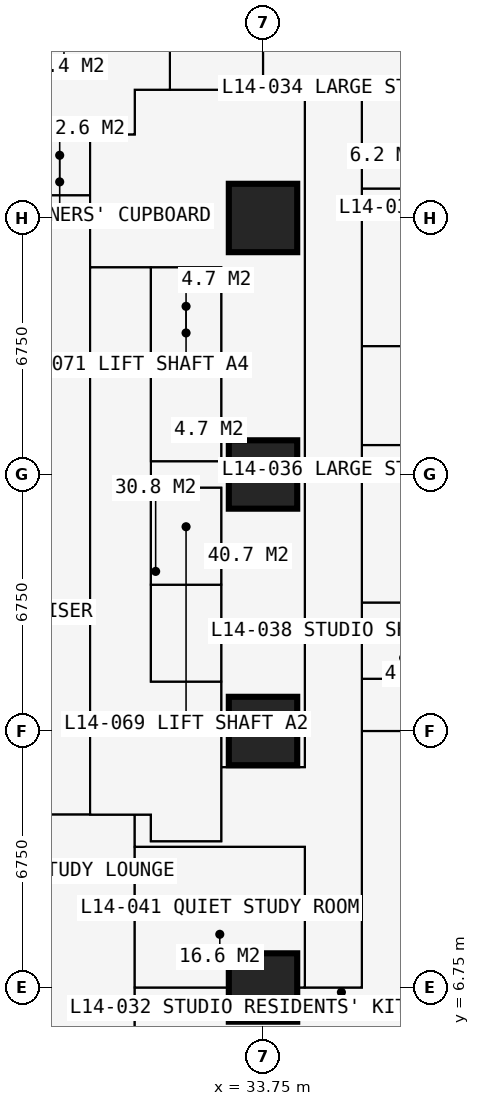
"""IFC4 building model, lengths in metres.
Left out: names, types, materials, properties, quantities, classifications, styles, units other than length and angle.
Written with IfcOpenShell. Run it as: python <this file> out.ifc"""

import sys

from ifc_helpers import new_model, si_unit, direction, frame, frame_2d, origin, origin_2d, place, context, subcontext, project, spatial, rectangle, extrude, element, fill, save


model = new_model("IFC4")
c1 = context("Model", 3, precision=1e-05, world=origin(), true_north=direction((0.0, 1.0)))
c2 = subcontext(c1, "Body", "Model", "MODEL_VIEW")
j1 = project(units=[si_unit("LENGTHUNIT", "METRE"), si_unit("PLANEANGLEUNIT", "RADIAN")], contexts=[c1])
p1 = place(None, origin())
s1 = spatial("IfcSite", under=j1, at=p1, CompositionType="ELEMENT")
p2 = place(p1, origin())
s2 = spatial("IfcBuilding", under=s1, at=p2, CompositionType="ELEMENT")
p3 = place(p2, frame((0.0, 0.0, 54.0)))
s3 = spatial("IfcBuildingStorey", under=s2, at=p3, CompositionType="ELEMENT", Elevation=54.0)
for number, where, z_axis, x_axis in (
    (1, (33.75, 6.75, 0.0), (0.0, 0.0, 1.0), (1.0, 0.0, 0.0)),
    (2, (33.75, 13.5, 0.0), (0.0, 0.0, 1.0), (1.0, 0.0, 0.0)),
    (3, (33.75, 20.25, 0.0), (0.0, 0.0, 1.0), (1.0, 0.0, 0.0)),
    (4, (33.75, 27.0, 0.0), (0.0, 0.0, 1.0), (1.0, 0.0, 0.0)),
):
    element("IfcColumn", number, at=place(p3, frame(where, z_axis=z_axis, x_axis=x_axis)), inside=s3, PredefinedType="COLUMN", context=c2, shape_type="SweptSolid", body=[
        extrude(rectangle(XDim=1.8, YDim=1.8, at=origin_2d()), origin(), (0.0, 0.0, 1.0), 3.6),
    ])
p4 = place(p3, frame((10.125, 11.3, 0.0), z_axis=(0.0, 0.0, 1.0), x_axis=(1.0, 0.0, 0.0)))
e5 = element("IfcWall", 5, at=p4, inside=s3, PredefinedType="PARTITIONING", context=c2, shape_type="SweptSolid", body=[
    extrude(rectangle(XDim=20.675, YDim=0.15, at=frame_2d((10.337, 0.0))), origin(), (0.0, 0.0, 1.0), 3.375),
])
p5 = place(p4, frame((1.775, 0.0, 0.0)))
e6 = element("IfcOpeningElement", 6, at=p5, cuts=e5, PredefinedType="OPENING", context=c2, shape_type="SweptSolid", body=[
    extrude(rectangle(XDim=1.0, YDim=2.2, at=frame_2d((0.5, 1.1))), frame((0.0, 0.085, 0.0), z_axis=(0.0, -1.0, 0.0), x_axis=(1.0, 0.0, 0.0)), (0.0, 0.0, 1.0), 0.17),
])
p6 = place(p4, frame((11.312, 0.0, 0.0)))
e7 = element("IfcOpeningElement", 7, at=p6, cuts=e5, PredefinedType="OPENING", context=c2, shape_type="SweptSolid", body=[
    extrude(rectangle(XDim=1.0, YDim=2.2, at=frame_2d((0.5, 1.1))), frame((0.0, 0.085, 0.0), z_axis=(0.0, -1.0, 0.0), x_axis=(1.0, 0.0, 0.0)), (0.0, 0.0, 1.0), 0.17),
])
p7 = place(p3, frame((11.3, 29.2, 0.0), z_axis=(0.0, 0.0, 1.0), x_axis=(1.0, 0.0, 0.0)))
e8 = element("IfcWall", 8, at=p7, inside=s3, PredefinedType="PARTITIONING", context=c2, shape_type="SweptSolid", body=[
    extrude(rectangle(XDim=19.075, YDim=0.15, at=frame_2d((9.538, 0.0))), origin(), (0.0, 0.0, 1.0), 3.375),
])
p8 = place(p7, frame((12.875, 0.0, 0.0)))
e9 = element("IfcOpeningElement", 9, at=p8, cuts=e8, PredefinedType="OPENING", context=c2, shape_type="SweptSolid", body=[
    extrude(rectangle(XDim=1.0, YDim=2.2, at=frame_2d((0.5, 1.1))), frame((0.0, 0.085, 0.0), z_axis=(0.0, -1.0, 0.0), x_axis=(1.0, 0.0, 0.0)), (0.0, 0.0, 1.0), 0.17),
])
p9 = place(p7, frame((10.438, 0.0, 0.0)))
e10 = element("IfcOpeningElement", 10, at=p9, cuts=e8, PredefinedType="OPENING", context=c2, shape_type="SweptSolid", body=[
    extrude(rectangle(XDim=1.0, YDim=2.2, at=frame_2d((0.5, 1.1))), frame((0.0, 0.085, 0.0), z_axis=(0.0, -1.0, 0.0), x_axis=(1.0, 0.0, 0.0)), (0.0, 0.0, 1.0), 0.17),
])
p10 = place(p7, frame((14.875, 0.0, 0.0)))
e11 = element("IfcOpeningElement", 11, at=p10, cuts=e8, PredefinedType="OPENING", context=c2, shape_type="SweptSolid", body=[
    extrude(rectangle(XDim=0.95, YDim=2.2, at=frame_2d((0.475, 1.1))), frame((0.0, 0.085, 0.0), z_axis=(0.0, -1.0, 0.0), x_axis=(1.0, 0.0, 0.0)), (0.0, 0.0, 1.0), 0.17),
])
p11 = place(p3, frame((27.6, 27.6, 0.0), z_axis=(0.0, 0.0, 1.0), x_axis=(1.0, 0.0, 0.0)))
e12 = element("IfcWall", 12, at=p11, inside=s3, PredefinedType="PARTITIONING", context=c2, shape_type="SweptSolid", body=[
    extrude(rectangle(XDim=1.6, YDim=0.15, at=frame_2d((0.8, 0.0))), origin(), (0.0, 0.0, 1.0), 2.877),
])
p12 = place(p3, frame((29.2, 11.3, 0.0), z_axis=(0.0, 0.0, 1.0), x_axis=(0.0, 1.0, 0.0)))
e13 = element("IfcWall", 13, at=p12, inside=s3, PredefinedType="PARTITIONING", context=c2, shape_type="SweptSolid", body=[
    extrude(rectangle(XDim=17.9, YDim=0.2, at=frame_2d((8.95, 0.0))), origin(), (0.0, 0.0, 1.0), 3.375),
])
p13 = place(p12, frame((8.35, 0.0, 0.0)))
e14 = element("IfcOpeningElement", 14, at=p13, cuts=e13, PredefinedType="OPENING", context=c2, shape_type="SweptSolid", body=[
    extrude(rectangle(XDim=1.2, YDim=2.2, at=frame_2d((0.6, 1.1))), frame((0.0, 0.11, 0.0), z_axis=(0.0, -1.0, 0.0), x_axis=(1.0, 0.0, 0.0)), (0.0, 0.0, 1.0), 0.22),
])
p14 = place(p3, frame((29.2, 25.7, 0.0), z_axis=(0.0, 0.0, 1.0), x_axis=(1.0, 0.0, 0.0)))
e15 = element("IfcWall", 15, at=p14, inside=s3, PredefinedType="SHEAR", context=c2, shape_type="SweptSolid", body=[
    extrude(rectangle(XDim=3.45, YDim=0.1, at=frame_2d((1.725, 0.0))), origin(), (0.0, 0.0, 1.0), 3.375),
])
p15 = place(p3, frame((30.375, -0.734, 0.0), z_axis=(0.0, 0.0, 1.0), x_axis=(0.0, 1.0, 0.0)))
e16 = element("IfcWall", 16, at=p15, inside=s3, PredefinedType="PARTITIONING", context=c2, shape_type="SweptSolid", body=[
    extrude(rectangle(XDim=12.034, YDim=0.15, at=frame_2d((6.017, 0.0))), origin(), (0.0, 0.0, 1.0), 3.375),
])
p16 = place(p15, frame((5.134, 0.0, 0.0)))
e17 = element("IfcOpeningElement", 17, at=p16, cuts=e16, PredefinedType="OPENING", context=c2, shape_type="SweptSolid", body=[
    extrude(rectangle(XDim=1.0, YDim=2.2, at=frame_2d((0.5, 1.1))), frame((0.0, 0.085, 0.0), z_axis=(0.0, -1.0, 0.0), x_axis=(1.0, 0.0, 0.0)), (0.0, 0.0, 1.0), 0.17),
])
p17 = place(p3, frame((30.375, 6.75, 0.0), z_axis=(0.0, 0.0, 1.0), x_axis=(1.0, 0.0, 0.0)))
e18 = element("IfcWall", 18, at=p17, inside=s3, PredefinedType="PARTITIONING", context=c2, shape_type="SweptSolid", body=[
    extrude(rectangle(XDim=5.975, YDim=0.15, at=frame_2d((2.988, 0.0))), origin(), (0.0, 0.0, 1.0), 2.877),
])
p18 = place(p3, frame((30.375, 10.45, 0.0), z_axis=(0.0, 0.0, 1.0), x_axis=(1.0, 0.0, 0.0)))
e19 = element("IfcWall", 19, at=p18, inside=s3, PredefinedType="PARTITIONING", context=c2, shape_type="SweptSolid", body=[
    extrude(rectangle(XDim=4.475, YDim=0.15, at=frame_2d((2.238, 0.0))), origin(), (0.0, 0.0, 1.0), 3.375),
])
p19 = place(p18, frame((2.35, 0.0, 0.0)))
e20 = element("IfcOpeningElement", 20, at=p19, cuts=e19, PredefinedType="OPENING", context=c2, shape_type="SweptSolid", body=[
    extrude(rectangle(XDim=0.95, YDim=2.2, at=frame_2d((0.475, 1.1))), frame((0.0, 0.085, 0.0), z_axis=(0.0, -1.0, 0.0), x_axis=(1.0, 0.0, 0.0)), (0.0, 0.0, 1.0), 0.17),
])
p20 = place(p3, frame((30.375, 29.2, 0.0), z_axis=(0.0, 0.0, 1.0), x_axis=(0.0, 1.0, 0.0)))
e21 = element("IfcWall", 21, at=p20, inside=s3, PredefinedType="PARTITIONING", context=c2, shape_type="SweptSolid", body=[
    extrude(rectangle(XDim=1.175, YDim=0.15, at=frame_2d((0.587, 0.0))), origin(), (0.0, 0.0, 1.0), 3.375),
])
p21 = place(p3, frame((30.375, 30.375, 0.0), z_axis=(0.0, 0.0, 1.0), x_axis=(1.0, 0.0, 0.0)))
e22 = element("IfcWall", 22, at=p21, inside=s3, PredefinedType="PARTITIONING", context=c2, shape_type="SweptSolid", body=[
    extrude(rectangle(XDim=10.859, YDim=0.15, at=frame_2d((5.429, 0.0))), origin(), (0.0, 0.0, 1.0), 3.375),
])
p22 = place(p3, frame((30.8, 10.6, 0.0), z_axis=(0.0, 0.0, 1.0), x_axis=(0.0, 1.0, 0.0)))
e23 = element("IfcWall", 23, at=p22, inside=s3, PredefinedType="PARTITIONING", context=c2, shape_type="SweptSolid", body=[
    extrude(rectangle(XDim=0.7, YDim=0.15, at=frame_2d((0.35, 0.0))), origin(), (0.0, 0.0, 1.0), 3.375),
])
p23 = place(p3, frame((30.8, 10.6, 0.0), z_axis=(0.0, 0.0, 1.0), x_axis=(1.0, 0.0, 0.0)))
e24 = element("IfcWall", 24, at=p23, inside=s3, PredefinedType="PARTITIONING", context=c2, shape_type="SweptSolid", body=[
    extrude(rectangle(XDim=1.85, YDim=0.15, at=frame_2d((0.925, 0.0))), origin(), (0.0, 0.0, 1.0), 3.375),
])
p24 = place(p3, frame((30.8, 14.8, 0.0), z_axis=(0.0, 0.0, 1.0), x_axis=(0.0, 1.0, 0.0)))
e25 = element("IfcWall", 25, at=p24, inside=s3, PredefinedType="PARTITIONING", context=c2, shape_type="SweptSolid", body=[
    extrude(rectangle(XDim=10.9, YDim=0.15, at=frame_2d((5.45, 0.0))), origin(), (0.0, 0.0, 1.0), 3.375),
])
p25 = place(p24, frame((0.75, 0.0, 0.0)))
e26 = element("IfcOpeningElement", 26, at=p25, cuts=e25, PredefinedType="OPENING", context=c2, shape_type="SweptSolid", body=[
    extrude(rectangle(XDim=1.1, YDim=2.2, at=frame_2d((0.55, 1.1))), frame((0.0, 0.085, 0.0), z_axis=(0.0, -1.0, 0.0), x_axis=(1.0, 0.0, 0.0)), (0.0, 0.0, 1.0), 0.17),
])
p26 = place(p24, frame((3.25, 0.0, 0.0)))
e27 = element("IfcOpeningElement", 27, at=p26, cuts=e25, PredefinedType="OPENING", context=c2, shape_type="SweptSolid", body=[
    extrude(rectangle(XDim=1.1, YDim=2.2, at=frame_2d((0.55, 1.1))), frame((0.0, 0.085, 0.0), z_axis=(0.0, -1.0, 0.0), x_axis=(1.0, 0.0, 0.0)), (0.0, 0.0, 1.0), 0.17),
])
p27 = place(p24, frame((6.5, 0.0, 0.0)))
e28 = element("IfcOpeningElement", 28, at=p27, cuts=e25, PredefinedType="OPENING", context=c2, shape_type="SweptSolid", body=[
    extrude(rectangle(XDim=1.1, YDim=2.2, at=frame_2d((0.55, 1.1))), frame((0.0, 0.085, 0.0), z_axis=(0.0, -1.0, 0.0), x_axis=(1.0, 0.0, 0.0)), (0.0, 0.0, 1.0), 0.17),
])
p28 = place(p24, frame((9.05, 0.0, 0.0)))
e29 = element("IfcOpeningElement", 29, at=p28, cuts=e25, PredefinedType="OPENING", context=c2, shape_type="SweptSolid", body=[
    extrude(rectangle(XDim=1.1, YDim=2.2, at=frame_2d((0.55, 1.1))), frame((0.0, 0.085, 0.0), z_axis=(0.0, -1.0, 0.0), x_axis=(1.0, 0.0, 0.0)), (0.0, 0.0, 1.0), 0.17),
])
for number, where, z_axis, x_axis in (
    (30, (30.8, 14.8, 0.0), (0.0, 0.0, 1.0), (1.0, 0.0, 0.0)),
    (31, (30.8, 17.35, 0.0), (0.0, 0.0, 1.0), (1.0, 0.0, 0.0)),
    (32, (30.8, 19.9, 0.0), (0.0, 0.0, 1.0), (1.0, 0.0, 0.0)),
    (33, (30.8, 20.6, 0.0), (0.0, 0.0, 1.0), (1.0, 0.0, 0.0)),
    (34, (30.8, 23.15, 0.0), (0.0, 0.0, 1.0), (1.0, 0.0, 0.0)),
):
    element("IfcWall", number, at=place(p3, frame(where, z_axis=z_axis, x_axis=x_axis)), inside=s3, PredefinedType="SHEAR", context=c2, shape_type="SweptSolid", body=[
        extrude(rectangle(XDim=1.85, YDim=0.1, at=frame_2d((0.925, 0.0))), origin(), (0.0, 0.0, 1.0), 3.375),
    ])
p29 = place(p3, frame((31.3, 30.375, 0.0), z_axis=(0.0, 0.0, 1.0), x_axis=(0.0, 1.0, 0.0)))
e35 = element("IfcWall", 35, at=p29, inside=s3, PredefinedType="PARTITIONING", context=c2, shape_type="SweptSolid", body=[
    extrude(rectangle(XDim=4.475, YDim=0.15, at=frame_2d((2.238, 0.0))), origin(), (0.0, 0.0, 1.0), 3.375),
])
p30 = place(p3, frame((32.65, 10.6, 0.0), z_axis=(0.0, 0.0, 1.0), x_axis=(0.0, 1.0, 0.0)))
e36 = element("IfcWall", 36, at=p30, inside=s3, PredefinedType="SHEAR", context=c2, shape_type="SweptSolid", body=[
    extrude(rectangle(XDim=9.3, YDim=0.1, at=frame_2d((4.65, 0.0))), origin(), (0.0, 0.0, 1.0), 3.375),
])
p31 = place(p30, frame((0.5, 0.0, 0.0)))
e37 = element("IfcOpeningElement", 37, at=p31, cuts=e36, PredefinedType="OPENING", context=c2, shape_type="SweptSolid", body=[
    extrude(rectangle(XDim=1.0, YDim=2.2, at=frame_2d((0.5, 1.1))), frame((0.0, 0.06, 0.0), z_axis=(0.0, -1.0, 0.0), x_axis=(1.0, 0.0, 0.0)), (0.0, 0.0, 1.0), 0.12),
])
p32 = place(p3, frame((32.65, 12.55, 0.0), z_axis=(0.0, 0.0, 1.0), x_axis=(1.0, 0.0, 0.0)))
e38 = element("IfcWall", 38, at=p32, inside=s3, PredefinedType="PARTITIONING", context=c2, shape_type="SweptSolid", body=[
    extrude(rectangle(XDim=2.2, YDim=0.15, at=frame_2d((1.1, 0.0))), origin(), (0.0, 0.0, 1.0), 3.375),
])
p33 = place(p3, frame((32.65, 20.6, 0.0), z_axis=(0.0, 0.0, 1.0), x_axis=(0.0, 1.0, 0.0)))
e39 = element("IfcWall", 39, at=p33, inside=s3, PredefinedType="PARTITIONING", context=c2, shape_type="SweptSolid", body=[
    extrude(rectangle(XDim=5.1, YDim=0.15, at=frame_2d((2.55, 0.0))), origin(), (0.0, 0.0, 1.0), 3.375),
])
p34 = place(p3, frame((33.75, 30.375, 0.0), z_axis=(0.0, 0.0, 1.0), x_axis=(0.0, 1.0, 0.0)))
e40 = element("IfcWall", 40, at=p34, inside=s3, PredefinedType="PARTITIONING", context=c2, shape_type="SweptSolid", body=[
    extrude(rectangle(XDim=10.859, YDim=0.15, at=frame_2d((5.429, 0.0))), origin(), (0.0, 0.0, 1.0), 2.877),
])
p35 = place(p34, frame((1.45, 0.0, 0.0)))
e41 = element("IfcOpeningElement", 41, at=p35, cuts=e40, PredefinedType="OPENING", context=c2, shape_type="SweptSolid", body=[
    extrude(rectangle(XDim=1.0, YDim=2.2, at=frame_2d((0.5, 1.1))), frame((0.0, 0.085, 0.0), z_axis=(0.0, -1.0, 0.0), x_axis=(1.0, 0.0, 0.0)), (0.0, 0.0, 1.0), 0.17),
])
p36 = place(p3, frame((34.85, 6.75, 0.0), z_axis=(0.0, 0.0, 1.0), x_axis=(0.0, 1.0, 0.0)))
e42 = element("IfcWall", 42, at=p36, inside=s3, PredefinedType="PARTITIONING", context=c2, shape_type="SweptSolid", body=[
    extrude(rectangle(XDim=3.7, YDim=0.15, at=frame_2d((1.85, 0.0))), origin(), (0.0, 0.0, 1.0), 3.375),
])
p37 = place(p3, frame((34.85, 12.55, 0.0), z_axis=(0.0, 0.0, 1.0), x_axis=(0.0, 1.0, 0.0)))
e43 = element("IfcWall", 43, at=p37, inside=s3, PredefinedType="PARTITIONING", context=c2, shape_type="SweptSolid", body=[
    extrude(rectangle(XDim=17.825, YDim=0.15, at=frame_2d((8.913, 0.0))), origin(), (0.0, 0.0, 1.0), 3.375),
])
p38 = place(p37, frame((8.6, 0.0, 0.0)))
e44 = element("IfcOpeningElement", 44, at=p38, cuts=e43, PredefinedType="OPENING", context=c2, shape_type="SweptSolid", body=[
    extrude(rectangle(XDim=0.95, YDim=2.2, at=frame_2d((0.475, 1.1))), frame((0.0, 0.085, 0.0), z_axis=(0.0, -1.0, 0.0), x_axis=(1.0, 0.0, 0.0)), (0.0, 0.0, 1.0), 0.17),
])
p39 = place(p3, frame((36.35, 6.75, 0.0), z_axis=(0.0, 0.0, 1.0), x_axis=(0.0, 1.0, 0.0)))
e45 = element("IfcWall", 45, at=p39, inside=s3, PredefinedType="PARTITIONING", context=c2, shape_type="SweptSolid", body=[
    extrude(rectangle(XDim=23.625, YDim=0.15, at=frame_2d((11.812, 0.0))), origin(), (0.0, 0.0, 1.0), 3.375),
])
p40 = place(p39, frame((18.475, 0.0, 0.0)))
e46 = element("IfcOpeningElement", 46, at=p40, cuts=e45, PredefinedType="OPENING", context=c2, shape_type="SweptSolid", body=[
    extrude(rectangle(XDim=0.95, YDim=2.2, at=frame_2d((0.475, 1.1))), frame((0.0, 0.085, 0.0), z_axis=(0.0, -1.0, 0.0), x_axis=(1.0, 0.0, 0.0)), (0.0, 0.0, 1.0), 0.17),
])
p41 = place(p39, frame((11.725, 0.0, 0.0)))
e47 = element("IfcOpeningElement", 47, at=p41, cuts=e45, PredefinedType="OPENING", context=c2, shape_type="SweptSolid", body=[
    extrude(rectangle(XDim=0.95, YDim=2.2, at=frame_2d((0.475, 1.1))), frame((0.0, 0.085, 0.0), z_axis=(0.0, -1.0, 0.0), x_axis=(1.0, 0.0, 0.0)), (0.0, 0.0, 1.0), 0.17),
])
p42 = place(p39, frame((6.95, 0.0, 0.0)))
e48 = element("IfcOpeningElement", 48, at=p42, cuts=e45, PredefinedType="OPENING", context=c2, shape_type="SweptSolid", body=[
    extrude(rectangle(XDim=0.95, YDim=2.2, at=frame_2d((0.475, 1.1))), frame((0.0, 0.085, 0.0), z_axis=(0.0, -1.0, 0.0), x_axis=(1.0, 0.0, 0.0)), (0.0, 0.0, 1.0), 0.17),
])
p43 = place(p3, frame((36.35, 13.5, 0.0), z_axis=(0.0, 0.0, 1.0), x_axis=(1.0, 0.0, 0.0)))
e49 = element("IfcWall", 49, at=p43, inside=s3, PredefinedType="PARTITIONING", context=c2, shape_type="SweptSolid", body=[
    extrude(rectangle(XDim=4.884, YDim=0.15, at=frame_2d((2.442, 0.0))), origin(), (0.0, 0.0, 1.0), 2.877),
])
p44 = place(p3, frame((36.35, 14.875, 0.0), z_axis=(0.0, 0.0, 1.0), x_axis=(1.0, 0.0, 0.0)))
e50 = element("IfcWall", 50, at=p44, inside=s3, PredefinedType="PARTITIONING", context=c2, shape_type="SweptSolid", body=[
    extrude(rectangle(XDim=2.2, YDim=0.1, at=frame_2d((1.1, 0.0))), origin(), (0.0, 0.0, 1.0), 3.375),
])
p45 = place(p3, frame((36.35, 16.875, 0.0), z_axis=(0.0, 0.0, 1.0), x_axis=(1.0, 0.0, 0.0)))
e51 = element("IfcWall", 51, at=p45, inside=s3, PredefinedType="PARTITIONING", context=c2, shape_type="SweptSolid", body=[
    extrude(rectangle(XDim=4.884, YDim=0.175, at=frame_2d((2.442, 0.0))), origin(), (0.0, 0.0, 1.0), 3.375),
])
p46 = place(p45, frame((0.65, 0.0, 0.0)))
e52 = element("IfcOpeningElement", 52, at=p46, cuts=e51, PredefinedType="OPENING", context=c2, shape_type="SweptSolid", body=[
    extrude(rectangle(XDim=0.9, YDim=2.2, at=frame_2d((0.45, 1.1))), frame((0.0, 0.097, 0.0), z_axis=(0.0, -1.0, 0.0), x_axis=(1.0, 0.0, 0.0)), (0.0, 0.0, 1.0), 0.195),
])
p47 = place(p3, frame((36.35, 21.025, 0.0), z_axis=(0.0, 0.0, 1.0), x_axis=(1.0, 0.0, 0.0)))
e53 = element("IfcWall", 53, at=p47, inside=s3, PredefinedType="PARTITIONING", context=c2, shape_type="SweptSolid", body=[
    extrude(rectangle(XDim=2.4, YDim=0.1, at=frame_2d((1.2, 0.0))), origin(), (0.0, 0.0, 1.0), 3.375),
])
p48 = place(p3, frame((36.35, 23.625, 0.0), z_axis=(0.0, 0.0, 1.0), x_axis=(1.0, 0.0, 0.0)))
e54 = element("IfcWall", 54, at=p48, inside=s3, PredefinedType="PARTITIONING", context=c2, shape_type="SweptSolid", body=[
    extrude(rectangle(XDim=4.884, YDim=0.175, at=frame_2d((2.442, 0.0))), origin(), (0.0, 0.0, 1.0), 3.375),
])
p49 = place(p48, frame((0.75, 0.0, 0.0)))
e55 = element("IfcOpeningElement", 55, at=p49, cuts=e54, PredefinedType="OPENING", context=c2, shape_type="SweptSolid", body=[
    extrude(rectangle(XDim=0.9, YDim=2.2, at=frame_2d((0.45, 1.1))), frame((0.0, 0.097, 0.0), z_axis=(0.0, -1.0, 0.0), x_axis=(1.0, 0.0, 0.0)), (0.0, 0.0, 1.0), 0.195),
])
p50 = place(p3, frame((36.35, 27.775, 0.0), z_axis=(0.0, 0.0, 1.0), x_axis=(1.0, 0.0, 0.0)))
e56 = element("IfcWall", 56, at=p50, inside=s3, PredefinedType="PARTITIONING", context=c2, shape_type="SweptSolid", body=[
    extrude(rectangle(XDim=2.4, YDim=0.1, at=frame_2d((1.2, 0.0))), origin(), (0.0, 0.0, 1.0), 3.375),
])
p51 = place(p40, origin())
e57 = element("IfcDoor", 57, at=p51, inside=s3, OperationType="SINGLE_SWING_LEFT", PredefinedType="DOOR", context=c2, shape_type="SweptSolid", body=[
    extrude(rectangle(XDim=0.95, YDim=2.2, at=frame_2d((0.475, 1.1))), frame((0.0, 0.025, 0.0), z_axis=(0.0, -1.0, 0.0), x_axis=(1.0, 0.0, 0.0)), (0.0, 0.0, 1.0), 0.05),
])
fill(e46, e57)
p52 = place(p41, origin())
e58 = element("IfcDoor", 58, at=p52, inside=s3, OperationType="SINGLE_SWING_LEFT", PredefinedType="DOOR", context=c2, shape_type="SweptSolid", body=[
    extrude(rectangle(XDim=0.95, YDim=2.2, at=frame_2d((0.475, 1.1))), frame((0.0, 0.025, 0.0), z_axis=(0.0, -1.0, 0.0), x_axis=(1.0, 0.0, 0.0)), (0.0, 0.0, 1.0), 0.05),
])
fill(e47, e58)
p53 = place(p49, origin())
e59 = element("IfcDoor", 59, at=p53, inside=s3, OperationType="SINGLE_SWING_RIGHT", PredefinedType="DOOR", context=c2, shape_type="SweptSolid", body=[
    extrude(rectangle(XDim=0.9, YDim=2.2, at=frame_2d((0.45, 1.1))), frame((0.0, 0.025, 0.0), z_axis=(0.0, -1.0, 0.0), x_axis=(1.0, 0.0, 0.0)), (0.0, 0.0, 1.0), 0.05),
])
fill(e55, e59)
p54 = place(p42, origin())
e60 = element("IfcDoor", 60, at=p54, inside=s3, OperationType="SINGLE_SWING_LEFT", PredefinedType="DOOR", context=c2, shape_type="SweptSolid", body=[
    extrude(rectangle(XDim=0.95, YDim=2.2, at=frame_2d((0.475, 1.1))), frame((0.0, 0.025, 0.0), z_axis=(0.0, -1.0, 0.0), x_axis=(1.0, 0.0, 0.0)), (0.0, 0.0, 1.0), 0.05),
])
fill(e48, e60)
p55 = place(p46, origin())
e61 = element("IfcDoor", 61, at=p55, inside=s3, OperationType="SINGLE_SWING_RIGHT", PredefinedType="DOOR", context=c2, shape_type="SweptSolid", body=[
    extrude(rectangle(XDim=0.9, YDim=2.2, at=frame_2d((0.45, 1.1))), frame((0.0, 0.025, 0.0), z_axis=(0.0, -1.0, 0.0), x_axis=(1.0, 0.0, 0.0)), (0.0, 0.0, 1.0), 0.05),
])
fill(e52, e61)
p56 = place(p31, origin())
e62 = element("IfcDoor", 62, at=p56, inside=s3, OperationType="SINGLE_SWING_LEFT", PredefinedType="DOOR", context=c2, shape_type="SweptSolid", body=[
    extrude(rectangle(XDim=1.0, YDim=2.2, at=frame_2d((0.5, 1.1))), frame((0.0, 0.025, 0.0), z_axis=(0.0, -1.0, 0.0), x_axis=(1.0, 0.0, 0.0)), (0.0, 0.0, 1.0), 0.05),
])
fill(e37, e62)
p57 = place(p38, origin())
e63 = element("IfcDoor", 63, at=p57, inside=s3, OperationType="SINGLE_SWING_LEFT", PredefinedType="DOOR", context=c2, shape_type="SweptSolid", body=[
    extrude(rectangle(XDim=0.95, YDim=2.2, at=frame_2d((0.475, 1.1))), frame((0.0, 0.025, 0.0), z_axis=(0.0, -1.0, 0.0), x_axis=(1.0, 0.0, 0.0)), (0.0, 0.0, 1.0), 0.05),
])
fill(e44, e63)
p58 = place(p19, origin())
e64 = element("IfcDoor", 64, at=p58, inside=s3, OperationType="SINGLE_SWING_LEFT", PredefinedType="DOOR", context=c2, shape_type="SweptSolid", body=[
    extrude(rectangle(XDim=0.95, YDim=2.2, at=frame_2d((0.475, 1.1))), frame((0.0, 0.025, 0.0), z_axis=(0.0, -1.0, 0.0), x_axis=(1.0, 0.0, 0.0)), (0.0, 0.0, 1.0), 0.05),
])
fill(e20, e64)
p59 = place(p25, origin())
e65 = element("IfcDoor", 65, at=p59, inside=s3, OperationType="DOUBLE_DOOR_SLIDING", PredefinedType="DOOR", context=c2, shape_type="SweptSolid", body=[
    extrude(rectangle(XDim=1.1, YDim=2.2, at=frame_2d((0.55, 1.1))), frame((0.0, 0.025, 0.0), z_axis=(0.0, -1.0, 0.0), x_axis=(1.0, 0.0, 0.0)), (0.0, 0.0, 1.0), 0.05),
])
fill(e26, e65)
p60 = place(p26, origin())
e66 = element("IfcDoor", 66, at=p60, inside=s3, OperationType="DOUBLE_DOOR_SLIDING", PredefinedType="DOOR", context=c2, shape_type="SweptSolid", body=[
    extrude(rectangle(XDim=1.1, YDim=2.2, at=frame_2d((0.55, 1.1))), frame((0.0, 0.025, 0.0), z_axis=(0.0, -1.0, 0.0), x_axis=(1.0, 0.0, 0.0)), (0.0, 0.0, 1.0), 0.05),
])
fill(e27, e66)
p61 = place(p27, origin())
e67 = element("IfcDoor", 67, at=p61, inside=s3, OperationType="DOUBLE_DOOR_SLIDING", PredefinedType="DOOR", context=c2, shape_type="SweptSolid", body=[
    extrude(rectangle(XDim=1.1, YDim=2.2, at=frame_2d((0.55, 1.1))), frame((0.0, 0.025, 0.0), z_axis=(0.0, -1.0, 0.0), x_axis=(1.0, 0.0, 0.0)), (0.0, 0.0, 1.0), 0.05),
])
fill(e28, e67)
p62 = place(p28, origin())
e68 = element("IfcDoor", 68, at=p62, inside=s3, OperationType="DOUBLE_DOOR_SLIDING", PredefinedType="DOOR", context=c2, shape_type="SweptSolid", body=[
    extrude(rectangle(XDim=1.1, YDim=2.2, at=frame_2d((0.55, 1.1))), frame((0.0, 0.025, 0.0), z_axis=(0.0, -1.0, 0.0), x_axis=(1.0, 0.0, 0.0)), (0.0, 0.0, 1.0), 0.05),
])
fill(e29, e68)
p63 = place(p13, origin())
e69 = element("IfcDoor", 69, at=p63, inside=s3, OperationType="DOUBLE_DOOR_SINGLE_SWING", PredefinedType="DOOR", context=c2, shape_type="SweptSolid", body=[
    extrude(rectangle(XDim=1.2, YDim=2.2, at=frame_2d((0.6, 1.1))), frame((0.0, 0.025, 0.0), z_axis=(0.0, -1.0, 0.0), x_axis=(1.0, 0.0, 0.0)), (0.0, 0.0, 1.0), 0.05),
])
fill(e14, e69)
save(model, sys.argv[1])
